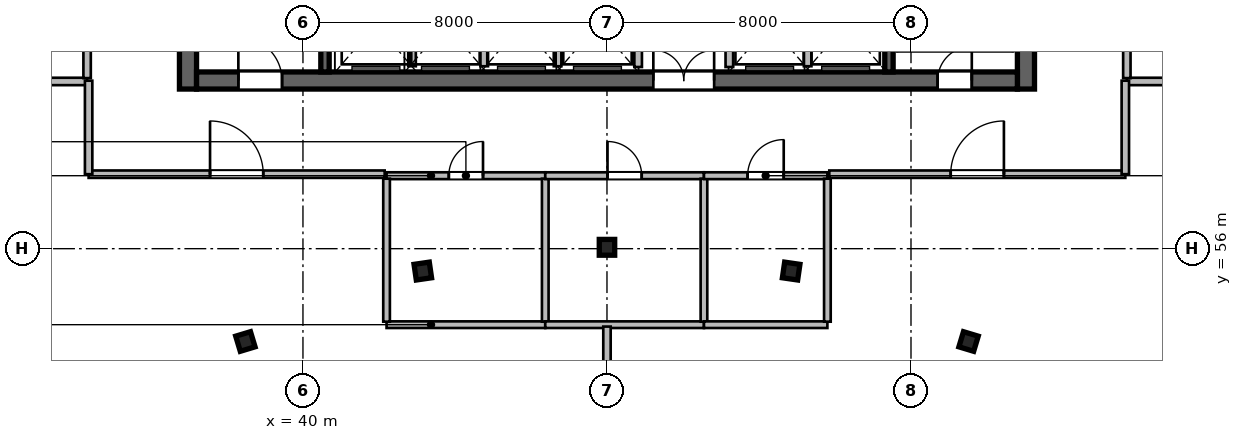
"""IFC4 building model, lengths in metres.
Left out: names, types, materials, properties, quantities, classifications, styles, units other than length and angle.
Written with IfcOpenShell. Run it as: python <this file> out.ifc"""

import sys

from ifc_helpers import new_model, si_unit, direction, frame, frame_2d, origin, origin_2d, place, context, subcontext, project, spatial, rectangle, i_section, extrude, source, transform, mapped, element, fill, save


model = new_model("IFC4")
c1 = context("Model", 3, precision=1e-05, world=origin(), true_north=direction((0.0, 1.0)))
c2 = subcontext(c1, "Body", "Model", "MODEL_VIEW")
j1 = project(units=[si_unit("LENGTHUNIT", "METRE"), si_unit("PLANEANGLEUNIT", "RADIAN")], contexts=[c1])
p1 = place(None, origin())
s1 = spatial("IfcSite", under=j1, at=p1, CompositionType="ELEMENT")
p2 = place(p1, origin())
s2 = spatial("IfcBuilding", under=s1, at=p2, CompositionType="ELEMENT")
p3 = place(p2, frame((0.0, 0.0, 199.2)))
s3 = spatial("IfcBuildingStorey", under=s2, at=p3, CompositionType="ELEMENT", Elevation=199.2)
m1 = source(origin(), c2, "Body", "SweptSolid", [
    extrude(rectangle(XDim=12.0, YDim=0.45, at=frame_2d((6.0, 0.0))), origin(), (0.0, 0.0, 1.0), 4.8),
])
for number, where, z_axis, x_axis in (
    (1, (36.975, 60.2, 0.0), (0.0, 0.0, 1.0), (0.0, 1.0, 0.0)),
    (2, (59.025, 60.2, 0.0), (0.0, 0.0, 1.0), (0.0, 1.0, 0.0)),
):
    element("IfcWall", number, at=place(p3, frame(where, z_axis=z_axis, x_axis=x_axis)), inside=s3, PredefinedType="SHEAR", context=c2, shape_type="MappedRepresentation", body=[
        mapped(m1, transform((0.0, 0.0, 0.0), scale=1.0)),
    ])
m2 = source(origin(), c2, "Body", "SweptSolid", [
    extrude(rectangle(XDim=21.6, YDim=0.45, at=frame_2d((10.8, 0.0))), origin(), (0.0, 0.0, 1.0), 4.8),
])
p4 = place(p3, frame((37.2, 60.425, 0.0), z_axis=(0.0, 0.0, 1.0), x_axis=(1.0, 0.0, 0.0)))
e3 = element("IfcWall", 3, at=p4, inside=s3, PredefinedType="SHEAR", context=c2, shape_type="MappedRepresentation", body=[
    mapped(m2, transform((0.0, 0.0, 0.0), scale=1.0)),
])
p5 = place(p4, frame((1.1, 0.0, 0.0)))
e4 = element("IfcOpeningElement", 4, at=p5, cuts=e3, PredefinedType="OPENING", context=c2, shape_type="SweptSolid", body=[
    extrude(rectangle(XDim=1.15, YDim=2.15, at=frame_2d((0.575, 1.075))), frame((0.0, 0.235, 0.0), z_axis=(0.0, -1.0, 0.0), x_axis=(1.0, 0.0, 0.0)), (0.0, 0.0, 1.0), 0.47),
])
p6 = place(p4, frame((19.5, 0.0, 0.0)))
e5 = element("IfcOpeningElement", 5, at=p6, cuts=e3, PredefinedType="OPENING", context=c2, shape_type="SweptSolid", body=[
    extrude(rectangle(XDim=0.9, YDim=2.1, at=frame_2d((0.45, 1.05))), frame((0.0, 0.235, 0.0), z_axis=(0.0, -1.0, 0.0), x_axis=(1.0, 0.0, 0.0)), (0.0, 0.0, 1.0), 0.47),
])
p7 = place(p4, frame((12.02, 0.0, 0.0)))
e6 = element("IfcOpeningElement", 6, at=p7, cuts=e3, PredefinedType="OPENING", context=c2, shape_type="SweptSolid", body=[
    extrude(rectangle(XDim=1.6, YDim=2.15, at=frame_2d((0.8, 1.075))), frame((0.0, 0.235, 0.0), z_axis=(0.0, -1.0, 0.0), x_axis=(1.0, 0.0, 0.0)), (0.0, 0.0, 1.0), 0.47),
])
m3 = source(origin(), c2, "Body", "SweptSolid", [
    extrude(rectangle(XDim=11.1, YDim=0.22, at=frame_2d((5.55, 0.0))), origin(), (0.0, 0.0, 1.0), 4.8),
])
p8 = place(p3, frame((40.58, 60.65, 0.0), z_axis=(0.0, 0.0, 1.0), x_axis=(0.0, 1.0, 0.0)))
e7 = element("IfcWall", 7, at=p8, inside=s3, PredefinedType="SHEAR", context=c2, shape_type="MappedRepresentation", body=[
    mapped(m3, transform((0.0, 0.0, 0.0), scale=1.0)),
])
p9 = place(p3, frame((55.42, 60.65, 0.0), z_axis=(0.0, 0.0, 1.0), x_axis=(0.0, 1.0, 0.0)))
e8 = element("IfcWall", 8, at=p9, inside=s3, PredefinedType="SHEAR", context=c2, shape_type="MappedRepresentation", body=[
    mapped(m3, transform((0.0, 0.0, 0.0), scale=1.0)),
])
p10 = place(p9, frame((9.595, 0.0, 0.0)))
e9 = element("IfcOpeningElement", 9, at=p10, cuts=e8, PredefinedType="OPENING", context=c2, shape_type="SweptSolid", body=[
    extrude(rectangle(XDim=1.15, YDim=2.15, at=frame_2d((0.575, 1.075))), frame((0.0, 0.12, 0.0), z_axis=(0.0, -1.0, 0.0), x_axis=(1.0, 0.0, 0.0)), (0.0, 0.0, 1.0), 0.24),
])
m4 = source(origin(), c2, "Body", "SweptSolid", [
    extrude(i_section(OverallWidth=0.406, OverallDepth=0.416, WebThickness=0.03, FlangeThickness=0.048, at=origin_2d()), origin(), (0.0, 0.0, 1.0), 4.8),
])
for number, where, z_axis, x_axis in (
    (10, (38.485, 53.558, 0.0), (0.0, 0.0, 1.0), (-0.289, 0.957, 0.0)),
    (11, (43.154, 55.411, 0.0), (0.0, 0.0, 1.0), (-0.143, 0.99, 0.0)),
    (12, (48.0, 56.036, 0.0), (0.0, 0.0, 1.0), (0.0, 1.0, 0.0)),
    (13, (52.846, 55.411, 0.0), (0.0, 0.0, 1.0), (0.143, 0.99, 0.0)),
    (14, (57.515, 53.558, 0.0), (0.0, 0.0, 1.0), (0.289, 0.957, 0.0)),
):
    element("IfcColumn", number, at=place(p3, frame(where, z_axis=z_axis, x_axis=x_axis)), inside=s3, PredefinedType="COLUMN", context=c2, shape_type="MappedRepresentation", body=[
        mapped(m4, transform((0.0, 0.0, 0.0), scale=1.0)),
    ])
m5 = source(origin(), c2, "Body", "SweptSolid", [
    extrude(rectangle(XDim=2.24, YDim=0.2, at=frame_2d((1.12, 0.0))), origin(), (0.0, 0.0, 1.0), 4.54),
])
for number, where, z_axis, x_axis in (
    (15, (48.82, 60.78, 0.0), (0.0, 0.0, 1.0), (0.0, 1.0, 0.0)),
    (16, (51.22, 60.78, 0.0), (0.0, 0.0, 1.0), (0.0, 1.0, 0.0)),
):
    element("IfcWall", number, at=place(p3, frame(where, z_axis=z_axis, x_axis=x_axis)), inside=s3, PredefinedType="SOLIDWALL", context=c2, shape_type="MappedRepresentation", body=[
        mapped(m5, transform((0.0, 0.0, 0.0), scale=1.0)),
    ])
m6 = source(origin(), c2, "Body", "SweptSolid", [
    extrude(rectangle(XDim=2.2, YDim=0.2, at=frame_2d((1.1, 0.0))), origin(), (0.0, 0.0, 1.0), 4.54),
])
for number, where, z_axis, x_axis in (
    (17, (42.87, 60.8, 0.0), (0.0, 0.0, 1.0), (0.0, 1.0, 0.0)),
    (18, (44.77, 60.8, 0.0), (0.0, 0.0, 1.0), (0.0, 1.0, 0.0)),
    (19, (46.7, 60.8, 0.0), (0.0, 0.0, 1.0), (0.0, 1.0, 0.0)),
    (20, (53.28, 60.8, 0.0), (0.0, 0.0, 1.0), (0.0, 1.0, 0.0)),
):
    element("IfcWall", number, at=place(p3, frame(where, z_axis=z_axis, x_axis=x_axis)), inside=s3, PredefinedType="SOLIDWALL", context=c2, shape_type="MappedRepresentation", body=[
        mapped(m6, transform((0.0, 0.0, 0.0), scale=1.0)),
    ])
m7 = source(origin(), c2, "Body", "SweptSolid", [
    extrude(rectangle(XDim=4.176, YDim=0.175, at=frame_2d((2.088, 0.0))), origin(), (0.0, 0.0, 1.0), 4.54),
])
p11 = place(p3, frame((42.2, 54.0, 0.0), z_axis=(0.0, 0.0, 1.0), x_axis=(1.0, 0.0, 0.0)))
e21 = element("IfcWall", 21, at=p11, inside=s3, PredefinedType="PARTITIONING", context=c2, shape_type="MappedRepresentation", body=[
    mapped(m7, transform((0.0, 0.0, 0.0), scale=1.0)),
])
m8 = source(origin(), c2, "Body", "SweptSolid", [
    extrude(rectangle(XDim=4.176, YDim=0.18, at=frame_2d((2.088, 0.0))), origin(), (0.0, 0.0, 1.0), 4.54),
])
p12 = place(p3, frame((42.2, 57.92, 0.0), z_axis=(0.0, 0.0, 1.0), x_axis=(1.0, 0.0, 0.0)))
e22 = element("IfcWall", 22, at=p12, inside=s3, PredefinedType="PLUMBINGWALL", context=c2, shape_type="MappedRepresentation", body=[
    mapped(m8, transform((0.0, 0.0, 0.0), scale=1.0)),
])
p13 = place(p12, frame((1.638, 0.0, 0.0)))
e23 = element("IfcOpeningElement", 23, at=p13, cuts=e22, PredefinedType="OPENING", context=c2, shape_type="SweptSolid", body=[
    extrude(rectangle(XDim=0.9, YDim=2.08, at=frame_2d((0.45, 1.04))), frame((0.0, 0.1, 0.0), z_axis=(0.0, -1.0, 0.0), x_axis=(1.0, 0.0, 0.0)), (0.0, 0.0, 1.0), 0.2),
])
m9 = source(origin(), c2, "Body", "SweptSolid", [
    extrude(rectangle(XDim=3.763, YDim=0.175, at=frame_2d((1.881, 0.0))), origin(), (0.0, 0.0, 1.0), 4.54),
])
for number, where, z_axis, x_axis in (
    (24, (42.2, 54.079, 0.0), (0.0, 0.0, 1.0), (0.0, 1.0, 0.0)),
    (25, (46.376, 54.079, 0.0), (0.0, 0.0, 1.0), (0.0, 1.0, 0.0)),
):
    element("IfcWall", number, at=place(p3, frame(where, z_axis=z_axis, x_axis=x_axis)), inside=s3, PredefinedType="PARTITIONING", context=c2, shape_type="MappedRepresentation", body=[
        mapped(m9, transform((0.0, 0.0, 0.0), scale=1.0)),
    ])
p14 = place(p3, frame((46.376, 54.0, 0.0), z_axis=(0.0, 0.0, 1.0), x_axis=(1.0, 0.0, 0.0)))
e26 = element("IfcWall", 26, at=p14, inside=s3, PredefinedType="PARTITIONING", context=c2, shape_type="MappedRepresentation", body=[
    mapped(m7, transform((0.0, 0.0, 0.0), scale=1.0)),
])
p15 = place(p3, frame((46.376, 57.92, 0.0), z_axis=(0.0, 0.0, 1.0), x_axis=(1.0, 0.0, 0.0)))
e27 = element("IfcWall", 27, at=p15, inside=s3, PredefinedType="PLUMBINGWALL", context=c2, shape_type="MappedRepresentation", body=[
    mapped(m8, transform((0.0, 0.0, 0.0), scale=1.0)),
])
p16 = place(p15, frame((1.638, 0.0, 0.0)))
e28 = element("IfcOpeningElement", 28, at=p16, cuts=e27, PredefinedType="OPENING", context=c2, shape_type="SweptSolid", body=[
    extrude(rectangle(XDim=0.9, YDim=2.08, at=frame_2d((0.45, 1.04))), frame((0.0, 0.1, 0.0), z_axis=(0.0, -1.0, 0.0), x_axis=(1.0, 0.0, 0.0)), (0.0, 0.0, 1.0), 0.2),
])
p17 = place(p3, frame((50.552, 54.079, 0.0), z_axis=(0.0, 0.0, 1.0), x_axis=(0.0, 1.0, 0.0)))
e29 = element("IfcWall", 29, at=p17, inside=s3, PredefinedType="PARTITIONING", context=c2, shape_type="MappedRepresentation", body=[
    mapped(m9, transform((0.0, 0.0, 0.0), scale=1.0)),
])
m10 = source(origin(), c2, "Body", "SweptSolid", [
    extrude(rectangle(XDim=3.248, YDim=0.175, at=frame_2d((1.624, 0.0))), origin(), (0.0, 0.0, 1.0), 4.54),
])
p18 = place(p3, frame((50.552, 54.0, 0.0), z_axis=(0.0, 0.0, 1.0), x_axis=(1.0, 0.0, 0.0)))
e30 = element("IfcWall", 30, at=p18, inside=s3, PredefinedType="PARTITIONING", context=c2, shape_type="MappedRepresentation", body=[
    mapped(m10, transform((0.0, 0.0, 0.0), scale=1.0)),
])
m11 = source(origin(), c2, "Body", "SweptSolid", [
    extrude(rectangle(XDim=3.248, YDim=0.18, at=frame_2d((1.624, 0.0))), origin(), (0.0, 0.0, 1.0), 4.54),
])
p19 = place(p3, frame((50.552, 57.92, 0.0), z_axis=(0.0, 0.0, 1.0), x_axis=(1.0, 0.0, 0.0)))
e31 = element("IfcWall", 31, at=p19, inside=s3, PredefinedType="PLUMBINGWALL", context=c2, shape_type="MappedRepresentation", body=[
    mapped(m11, transform((0.0, 0.0, 0.0), scale=1.0)),
])
p20 = place(p19, frame((1.149, 0.0, 0.0)))
e32 = element("IfcOpeningElement", 32, at=p20, cuts=e31, PredefinedType="OPENING", context=c2, shape_type="SweptSolid", body=[
    extrude(rectangle(XDim=0.95, YDim=2.12, at=frame_2d((0.475, 1.06))), frame((0.0, 0.1, 0.0), z_axis=(0.0, -1.0, 0.0), x_axis=(1.0, 0.0, 0.0)), (0.0, 0.0, 1.0), 0.2),
])
p21 = place(p3, frame((53.8, 54.079, 0.0), z_axis=(0.0, 0.0, 1.0), x_axis=(0.0, 1.0, 0.0)))
e33 = element("IfcWall", 33, at=p21, inside=s3, PredefinedType="PARTITIONING", context=c2, shape_type="MappedRepresentation", body=[
    mapped(m9, transform((0.0, 0.0, 0.0), scale=1.0)),
])
m12 = source(origin(), c2, "Body", "SweptSolid", [
    extrude(rectangle(XDim=6.82, YDim=0.195, at=frame_2d((3.41, 0.0))), origin(), (0.0, 0.0, 1.0), 4.54),
])
p22 = place(p3, frame((61.68, 60.4, 0.0), z_axis=(0.0, 0.0, 1.0), x_axis=(1.0, 0.0, 0.0)))
e34 = element("IfcWall", 34, at=p22, inside=s3, PredefinedType="PARTITIONING", context=c2, shape_type="MappedRepresentation", body=[
    mapped(m12, transform((0.0, 0.0, 0.0), scale=1.0)),
])
m13 = source(origin(), c2, "Body", "SweptSolid", [
    extrude(rectangle(XDim=4.925, YDim=0.195, at=frame_2d((2.462, 0.0))), origin(), (0.0, 0.0, 1.0), 4.54),
])
p23 = place(p3, frame((61.68, 60.488, 0.0), z_axis=(0.0, 0.0, 1.0), x_axis=(0.0, 1.0, 0.0)))
e35 = element("IfcWall", 35, at=p23, inside=s3, PredefinedType="PARTITIONING", context=c2, shape_type="MappedRepresentation", body=[
    mapped(m13, transform((0.0, 0.0, 0.0), scale=1.0)),
])
p24 = place(p23, frame((1.912, 0.0, 0.0)))
e36 = element("IfcOpeningElement", 36, at=p24, cuts=e35, PredefinedType="OPENING", context=c2, shape_type="SweptSolid", body=[
    extrude(rectangle(XDim=1.1, YDim=2.15, at=frame_2d((0.55, 1.075))), frame((0.0, 0.107, 0.0), z_axis=(0.0, -1.0, 0.0), x_axis=(1.0, 0.0, 0.0)), (0.0, 0.0, 1.0), 0.215),
])
m14 = source(origin(), c2, "Body", "SweptSolid", [
    extrude(rectangle(XDim=16.32, YDim=0.195, at=frame_2d((8.16, 0.0))), origin(), (0.0, 0.0, 1.0), 4.54),
])
p25 = place(p3, frame((18.0, 60.4, 0.0), z_axis=(0.0, 0.0, 1.0), x_axis=(1.0, 0.0, 0.0)))
e37 = element("IfcWall", 37, at=p25, inside=s3, PredefinedType="PARTITIONING", context=c2, shape_type="MappedRepresentation", body=[
    mapped(m14, transform((0.0, 0.0, 0.0), scale=1.0)),
])
m15 = source(origin(), c2, "Body", "SweptSolid", [
    extrude(rectangle(XDim=7.224, YDim=0.195, at=frame_2d((3.612, 0.0))), origin(), (0.0, 0.0, 1.0), 4.54),
])
p26 = place(p3, frame((34.32, 60.488, 0.0), z_axis=(0.0, 0.0, 1.0), x_axis=(0.0, 1.0, 0.0)))
e38 = element("IfcWall", 38, at=p26, inside=s3, PredefinedType="PARTITIONING", context=c2, shape_type="MappedRepresentation", body=[
    mapped(m15, transform((0.0, 0.0, 0.0), scale=1.0)),
])
p27 = place(p26, frame((2.912, 0.0, 0.0)))
e39 = element("IfcOpeningElement", 39, at=p27, cuts=e38, PredefinedType="OPENING", context=c2, shape_type="SweptSolid", body=[
    extrude(rectangle(XDim=1.4, YDim=2.15, at=frame_2d((0.7, 1.075))), frame((0.0, 0.107, 0.0), z_axis=(0.0, -1.0, 0.0), x_axis=(1.0, 0.0, 0.0)), (0.0, 0.0, 1.0), 0.215),
])
m16 = source(origin(), c2, "Body", "SweptSolid", [
    extrude(rectangle(XDim=1.677, YDim=0.195, at=frame_2d((0.839, 0.0))), origin(), (0.0, 0.0, 1.0), 4.54),
])
p28 = place(p3, frame((48.0, 52.273, 0.0), z_axis=(0.0, 0.0, 1.0), x_axis=(0.0, 1.0, 0.0)))
e40 = element("IfcWall", 40, at=p28, inside=s3, PredefinedType="PARTITIONING", context=c2, shape_type="MappedRepresentation", body=[
    mapped(m16, transform((0.0, 0.0, 0.0), scale=1.0)),
])
m17 = source(origin(), c2, "Body", "SweptSolid", [
    extrude(rectangle(XDim=7.79, YDim=0.195, at=frame_2d((3.895, 0.0))), origin(), (0.0, 0.0, 1.0), 3.985),
])
p29 = place(p3, frame((34.36, 57.96, 0.0), z_axis=(0.0, 0.0, 1.0), x_axis=(1.0, 0.0, 0.0)))
e41 = element("IfcWall", 41, at=p29, inside=s3, PredefinedType="PARTITIONING", context=c2, shape_type="MappedRepresentation", body=[
    mapped(m17, transform((0.0, 0.0, 0.0), scale=1.0)),
])
p30 = place(p29, frame((3.195, 0.0, 0.0)))
e42 = element("IfcOpeningElement", 42, at=p30, cuts=e41, PredefinedType="OPENING", context=c2, shape_type="SweptSolid", body=[
    extrude(rectangle(XDim=1.4, YDim=2.15, at=frame_2d((0.7, 1.075))), frame((0.0, 0.107, 0.0), z_axis=(0.0, -1.0, 0.0), x_axis=(1.0, 0.0, 0.0)), (0.0, 0.0, 1.0), 0.215),
])
p31 = place(p3, frame((53.85, 57.96, 0.0), z_axis=(0.0, 0.0, 1.0), x_axis=(1.0, 0.0, 0.0)))
e43 = element("IfcWall", 43, at=p31, inside=s3, PredefinedType="PARTITIONING", context=c2, shape_type="MappedRepresentation", body=[
    mapped(m17, transform((0.0, 0.0, 0.0), scale=1.0)),
])
p32 = place(p31, frame((3.195, 0.0, 0.0)))
e44 = element("IfcOpeningElement", 44, at=p32, cuts=e43, PredefinedType="OPENING", context=c2, shape_type="SweptSolid", body=[
    extrude(rectangle(XDim=1.4, YDim=2.15, at=frame_2d((0.7, 1.075))), frame((0.0, 0.107, 0.0), z_axis=(0.0, -1.0, 0.0), x_axis=(1.0, 0.0, 0.0)), (0.0, 0.0, 1.0), 0.215),
])
m18 = source(origin(), c2, "Body", "SweptSolid", [
    extrude(rectangle(XDim=2.46, YDim=0.195, at=frame_2d((1.23, 0.0))), origin(), (0.0, 0.0, 1.0), 4.54),
])
for number, where, z_axis, x_axis in (
    (45, (61.64, 57.96, 0.0), (0.0, 0.0, 1.0), (0.0, 1.0, 0.0)),
    (46, (34.36, 57.96, 0.0), (0.0, 0.0, 1.0), (0.0, 1.0, 0.0)),
):
    element("IfcWall", number, at=place(p3, frame(where, z_axis=z_axis, x_axis=x_axis)), inside=s3, PredefinedType="PARTITIONING", context=c2, shape_type="MappedRepresentation", body=[
        mapped(m18, transform((0.0, 0.0, 0.0), scale=1.0)),
    ])
m19 = source(origin(), c2, "Body", "SweptSolid", [
    extrude(rectangle(XDim=1.15, YDim=2.15, at=frame_2d((0.575, 1.075))), frame((0.0, 0.025, 0.0), z_axis=(0.0, -1.0, 0.0), x_axis=(1.0, 0.0, 0.0)), (0.0, 0.0, 1.0), 0.05),
])
p33 = place(p5, origin())
e47 = element("IfcDoor", 47, at=p33, inside=s3, OperationType="SINGLE_SWING_LEFT", PredefinedType="DOOR", context=c2, shape_type="MappedRepresentation", body=[
    mapped(m19, transform((0.0, 0.0, 0.0), scale=1.0)),
])
fill(e4, e47)
m20 = source(origin(), c2, "Body", "SweptSolid", [
    extrude(rectangle(XDim=0.9, YDim=2.1, at=frame_2d((0.45, 1.05))), frame((0.0, 0.025, 0.0), z_axis=(0.0, -1.0, 0.0), x_axis=(1.0, 0.0, 0.0)), (0.0, 0.0, 1.0), 0.05),
])
p34 = place(p6, origin())
e48 = element("IfcDoor", 48, at=p34, inside=s3, OperationType="SINGLE_SWING_RIGHT", PredefinedType="DOOR", context=c2, shape_type="MappedRepresentation", body=[
    mapped(m20, transform((0.0, 0.0, 0.0), scale=1.0)),
])
fill(e5, e48)
m21 = source(origin(), c2, "Body", "SweptSolid", [
    extrude(rectangle(XDim=1.6, YDim=2.15, at=frame_2d((0.8, 1.075))), frame((0.0, 0.025, 0.0), z_axis=(0.0, -1.0, 0.0), x_axis=(1.0, 0.0, 0.0)), (0.0, 0.0, 1.0), 0.05),
])
p35 = place(p7, origin())
e49 = element("IfcDoor", 49, at=p35, inside=s3, OperationType="DOUBLE_DOOR_SINGLE_SWING", PredefinedType="DOOR", context=c2, shape_type="MappedRepresentation", body=[
    mapped(m21, transform((0.0, 0.0, 0.0), scale=1.0)),
])
fill(e6, e49)
m22 = source(origin(), c2, "Body", "SweptSolid", [
    extrude(rectangle(XDim=0.9, YDim=2.08, at=frame_2d((0.45, 1.04))), frame((0.0, 0.025, 0.0), z_axis=(0.0, -1.0, 0.0), x_axis=(1.0, 0.0, 0.0)), (0.0, 0.0, 1.0), 0.05),
])
p36 = place(p13, origin())
e50 = element("IfcDoor", 50, at=p36, inside=s3, OperationType="SINGLE_SWING_RIGHT", PredefinedType="DOOR", context=c2, shape_type="MappedRepresentation", body=[
    mapped(m22, transform((0.0, 0.0, 0.0), scale=1.0)),
])
fill(e23, e50)
p37 = place(p16, origin())
e51 = element("IfcDoor", 51, at=p37, inside=s3, OperationType="SINGLE_SWING_LEFT", PredefinedType="DOOR", context=c2, shape_type="MappedRepresentation", body=[
    mapped(m22, transform((0.0, 0.0, 0.0), scale=1.0)),
])
fill(e28, e51)
m23 = source(origin(), c2, "Body", "SweptSolid", [
    extrude(rectangle(XDim=0.95, YDim=2.12, at=frame_2d((0.475, 1.06))), frame((0.0, 0.025, 0.0), z_axis=(0.0, -1.0, 0.0), x_axis=(1.0, 0.0, 0.0)), (0.0, 0.0, 1.0), 0.05),
])
p38 = place(p20, origin())
e52 = element("IfcDoor", 52, at=p38, inside=s3, OperationType="SINGLE_SWING_RIGHT", PredefinedType="DOOR", context=c2, shape_type="MappedRepresentation", body=[
    mapped(m23, transform((0.0, 0.0, 0.0), scale=1.0)),
])
fill(e32, e52)
m24 = source(origin(), c2, "Body", "SweptSolid", [
    extrude(rectangle(XDim=1.4, YDim=2.15, at=frame_2d((0.7, 1.075))), frame((0.0, 0.025, 0.0), z_axis=(0.0, -1.0, 0.0), x_axis=(1.0, 0.0, 0.0)), (0.0, 0.0, 1.0), 0.05),
])
p39 = place(p30, origin())
e53 = element("IfcDoor", 53, at=p39, inside=s3, OperationType="SINGLE_SWING_LEFT", PredefinedType="DOOR", context=c2, shape_type="MappedRepresentation", body=[
    mapped(m24, transform((0.0, 0.0, 0.0), scale=1.0)),
])
fill(e42, e53)
p40 = place(p32, origin())
e54 = element("IfcDoor", 54, at=p40, inside=s3, OperationType="SINGLE_SWING_RIGHT", PredefinedType="DOOR", context=c2, shape_type="MappedRepresentation", body=[
    mapped(m24, transform((0.0, 0.0, 0.0), scale=1.0)),
])
fill(e44, e54)
save(model, sys.argv[1])
